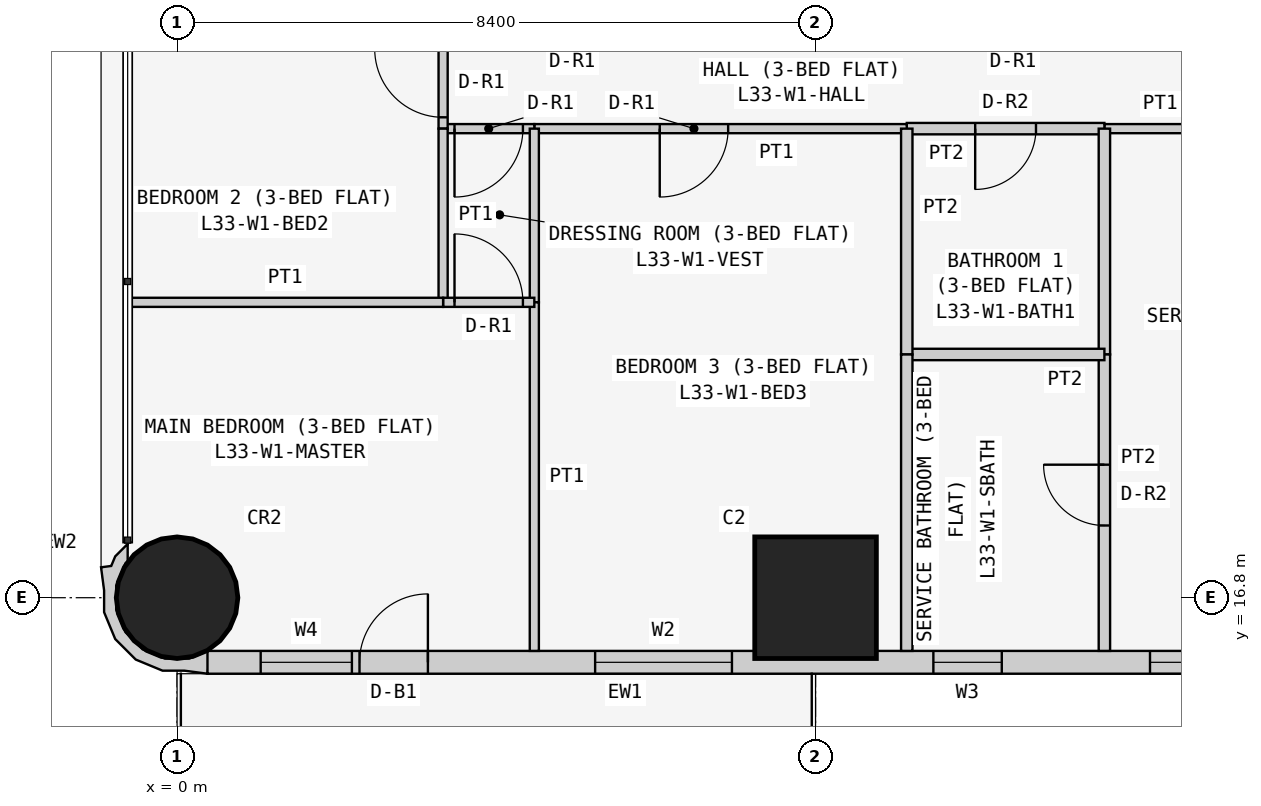
"""IFC4 building model, lengths in metres.
Left out: names, types, materials, properties, quantities, classifications, styles, units other than length and angle.
Written with IfcOpenShell. Run it as: python <this file> out.ifc"""

import sys

from ifc_helpers import new_model, si_unit, direction, frame, frame_2d, origin, origin_2d, place, context, subcontext, project, spatial, polyline, rectangle, circle, outline, extrude, element, fill, save


model = new_model("IFC4")
c1 = context("Model", 3, precision=1e-05, world=origin(), true_north=direction((0.0, 1.0)))
c2 = subcontext(c1, "Body", "Model", "MODEL_VIEW")
j1 = project(units=[si_unit("LENGTHUNIT", "METRE"), si_unit("PLANEANGLEUNIT", "RADIAN")], contexts=[c1])
p1 = place(None, origin())
s1 = spatial("IfcSite", under=j1, at=p1, CompositionType="ELEMENT")
p2 = place(p1, origin())
s2 = spatial("IfcBuilding", under=s1, at=p2, CompositionType="ELEMENT")
p3 = place(p2, frame((0.0, 0.0, 130.5)))
s3 = spatial("IfcBuildingStorey", under=s2, at=p3, CompositionType="ELEMENT", Elevation=130.5)
p4 = place(p3, frame((0.0, 16.8, 0.0), z_axis=(0.0, 0.0, 1.0), x_axis=(1.0, 0.0, 0.0)))
e1 = element("IfcColumn", 1, at=p4, inside=s3, PredefinedType="COLUMN", context=c2, shape_type="SweptSolid", body=[
    extrude(circle(Radius=0.8, at=origin_2d()), origin(), (0.0, 0.0, 1.0), 3.6),
])
p5 = place(p3, frame((8.4, 16.8, 0.0), z_axis=(0.0, 0.0, 1.0), x_axis=(1.0, 0.0, 0.0)))
e2 = element("IfcColumn", 2, at=p5, inside=s3, PredefinedType="COLUMN", context=c2, shape_type="SweptSolid", body=[
    extrude(rectangle(XDim=1.6, YDim=1.6, at=origin_2d()), origin(), (0.0, 0.0, 1.0), 3.6),
])
p6 = place(p3, frame((0.4, 15.95, 0.0), z_axis=(0.0, 0.0, 1.0), x_axis=(1.0, 0.0, 0.0)))
e3 = element("IfcWall", 3, at=p6, inside=s3, PredefinedType="SOLIDWALL", context=c2, shape_type="SweptSolid", body=[
    extrude(rectangle(XDim=15.7, YDim=0.3, at=frame_2d((7.85, 0.0))), origin(), (0.0, 0.0, 1.0), 3.45),
])
p7 = place(p6, frame((12.4, 0.0, 0.9)))
e4 = element("IfcOpeningElement", 4, at=p7, cuts=e3, PredefinedType="OPENING", context=c2, shape_type="SweptSolid", body=[
    extrude(rectangle(XDim=1.8, YDim=1.5, at=frame_2d((0.9, 0.75))), frame((0.0, 0.16, 0.0), z_axis=(0.0, -1.0, 0.0), x_axis=(1.0, 0.0, 0.0)), (0.0, 0.0, 1.0), 0.32),
])
p8 = place(p6, frame((9.55, 0.0, 1.5)))
e5 = element("IfcOpeningElement", 5, at=p8, cuts=e3, PredefinedType="OPENING", context=c2, shape_type="SweptSolid", body=[
    extrude(rectangle(XDim=0.9, YDim=0.7, at=frame_2d((0.45, 0.35))), frame((0.0, 0.16, 0.0), z_axis=(0.0, -1.0, 0.0), x_axis=(1.0, 0.0, 0.0)), (0.0, 0.0, 1.0), 0.32),
])
p9 = place(p6, frame((5.1, 0.0, 0.9)))
e6 = element("IfcOpeningElement", 6, at=p9, cuts=e3, PredefinedType="OPENING", context=c2, shape_type="SweptSolid", body=[
    extrude(rectangle(XDim=1.8, YDim=1.5, at=frame_2d((0.9, 0.75))), frame((0.0, 0.16, 0.0), z_axis=(0.0, -1.0, 0.0), x_axis=(1.0, 0.0, 0.0)), (0.0, 0.0, 1.0), 0.32),
])
p10 = place(p6, frame((2.0, 0.0, 0.0)))
e7 = element("IfcOpeningElement", 7, at=p10, cuts=e3, PredefinedType="OPENING", context=c2, shape_type="SweptSolid", body=[
    extrude(rectangle(XDim=0.9, YDim=2.4, at=frame_2d((0.45, 1.2))), frame((0.0, 0.16, 0.0), z_axis=(0.0, -1.0, 0.0), x_axis=(1.0, 0.0, 0.0)), (0.0, 0.0, 1.0), 0.32),
])
p11 = place(p6, frame((0.7, 0.0, 0.9)))
e8 = element("IfcOpeningElement", 8, at=p11, cuts=e3, PredefinedType="OPENING", context=c2, shape_type="SweptSolid", body=[
    extrude(rectangle(XDim=1.2, YDim=1.5, at=frame_2d((0.6, 0.75))), frame((0.0, 0.16, 0.0), z_axis=(0.0, -1.0, 0.0), x_axis=(1.0, 0.0, 0.0)), (0.0, 0.0, 1.0), 0.32),
])
p12 = place(p3, frame((-0.595, 17.448, 0.0), z_axis=(0.0, 0.0, 1.0), x_axis=(-0.93923434088, -0.343276641956, 0.0)))
e9 = element("IfcWall", 9, at=p12, inside=s3, PredefinedType="SOLIDWALL", context=c2, shape_type="SweptSolid", body=[
    extrude(outline(polyline([(-0.369, 1.89), (-0.509, 1.621), (-0.491, 1.614), (-0.479, 1.609), (-0.211, 1.62), (0.088, 1.511), (0.323, 1.295), (0.457, 1.006), (0.47, 0.688), (0.361, 0.389), (0.146, 0.154), (0.108, 0.137), (0.031, -0.075), (0.241, 0.023), (0.334, 0.124), (0.465, 0.094), (0.532, 0.393), (0.631, 0.663), (0.614, 1.045), (0.453, 1.391), (0.172, 1.649), (-0.098, 1.748), (-0.369, 1.89)])), origin(), (0.0, 0.0, 1.0), 3.45),
])
p13 = place(p3, frame((12.2, 22.971, 0.0), z_axis=(0.0, 0.0, 1.0), x_axis=(1.0, 0.0, 0.0)))
e10 = element("IfcWall", 10, at=p13, inside=s3, PredefinedType="PARTITIONING", context=c2, shape_type="SweptSolid", body=[
    extrude(rectangle(XDim=3.675, YDim=0.12, at=frame_2d((1.837, 0.0))), origin(), (0.0, 0.0, 1.0), 3.45),
])
p14 = place(p13, frame((1.35, 0.0, 0.0)))
e11 = element("IfcOpeningElement", 11, at=p14, cuts=e10, PredefinedType="OPENING", context=c2, shape_type="SweptSolid", body=[
    extrude(rectangle(XDim=0.9, YDim=2.1, at=frame_2d((0.45, 1.05))), frame((0.0, 0.07, 0.0), z_axis=(0.0, -1.0, 0.0), x_axis=(1.0, 0.0, 0.0)), (0.0, 0.0, 1.0), 0.14),
])
p15 = place(p3, frame((9.6, 22.971, 0.0), z_axis=(0.0, 0.0, 1.0), x_axis=(1.0, 0.0, 0.0)))
e12 = element("IfcWall", 12, at=p15, inside=s3, PredefinedType="PARTITIONING", context=c2, shape_type="SweptSolid", body=[
    extrude(rectangle(XDim=2.6, YDim=0.15, at=frame_2d((1.3, 0.0))), origin(), (0.0, 0.0, 1.0), 3.45),
])
p16 = place(p15, frame((0.9, 0.0, 0.0)))
e13 = element("IfcOpeningElement", 13, at=p16, cuts=e12, PredefinedType="OPENING", context=c2, shape_type="SweptSolid", body=[
    extrude(rectangle(XDim=0.8, YDim=2.1, at=frame_2d((0.4, 1.05))), frame((0.0, 0.085, 0.0), z_axis=(0.0, -1.0, 0.0), x_axis=(1.0, 0.0, 0.0)), (0.0, 0.0, 1.0), 0.17),
])
p17 = place(p3, frame((4.7, 22.971, 0.0), z_axis=(0.0, 0.0, 1.0), x_axis=(1.0, 0.0, 0.0)))
e14 = element("IfcWall", 14, at=p17, inside=s3, PredefinedType="PARTITIONING", context=c2, shape_type="SweptSolid", body=[
    extrude(rectangle(XDim=4.9, YDim=0.12, at=frame_2d((2.45, 0.0))), origin(), (0.0, 0.0, 1.0), 3.45),
])
p18 = place(p17, frame((1.65, 0.0, 0.0)))
e15 = element("IfcOpeningElement", 15, at=p18, cuts=e14, PredefinedType="OPENING", context=c2, shape_type="SweptSolid", body=[
    extrude(rectangle(XDim=0.9, YDim=2.1, at=frame_2d((0.45, 1.05))), frame((0.0, 0.07, 0.0), z_axis=(0.0, -1.0, 0.0), x_axis=(1.0, 0.0, 0.0)), (0.0, 0.0, 1.0), 0.14),
])
p19 = place(p3, frame((3.5, 22.971, 0.0), z_axis=(0.0, 0.0, 1.0), x_axis=(1.0, 0.0, 0.0)))
e16 = element("IfcWall", 16, at=p19, inside=s3, PredefinedType="PARTITIONING", context=c2, shape_type="SweptSolid", body=[
    extrude(rectangle(XDim=1.2, YDim=0.12, at=frame_2d((0.6, 0.0))), origin(), (0.0, 0.0, 1.0), 3.45),
])
p20 = place(p19, frame((0.15, 0.0, 0.0)))
e17 = element("IfcOpeningElement", 17, at=p20, cuts=e16, PredefinedType="OPENING", context=c2, shape_type="SweptSolid", body=[
    extrude(rectangle(XDim=0.9, YDim=2.1, at=frame_2d((0.45, 1.05))), frame((0.0, 0.07, 0.0), z_axis=(0.0, -1.0, 0.0), x_axis=(1.0, 0.0, 0.0)), (0.0, 0.0, 1.0), 0.14),
])
p21 = place(p3, frame((3.5, 24.171, 0.0), z_axis=(0.0, 0.0, 1.0), x_axis=(0.0, -1.0, 0.0)))
e18 = element("IfcWall", 18, at=p21, inside=s3, PredefinedType="PARTITIONING", context=c2, shape_type="SweptSolid", body=[
    extrude(rectangle(XDim=1.2, YDim=0.12, at=frame_2d((0.6, 0.0))), origin(), (0.0, 0.0, 1.0), 3.45),
])
p22 = place(p21, frame((0.151, 0.0, 0.0)))
e19 = element("IfcOpeningElement", 19, at=p22, cuts=e18, PredefinedType="OPENING", context=c2, shape_type="SweptSolid", body=[
    extrude(rectangle(XDim=0.9, YDim=2.1, at=frame_2d((0.45, 1.05))), frame((0.0, 0.07, 0.0), z_axis=(0.0, -1.0, 0.0), x_axis=(1.0, 0.0, 0.0)), (0.0, 0.0, 1.0), 0.14),
])
p23 = place(p3, frame((12.2, 22.971, 0.0), z_axis=(0.0, 0.0, 1.0), x_axis=(0.0, -1.0, 0.0)))
e20 = element("IfcWall", 20, at=p23, inside=s3, PredefinedType="PARTITIONING", context=c2, shape_type="SweptSolid", body=[
    extrude(rectangle(XDim=2.971, YDim=0.15, at=frame_2d((1.485, 0.0))), origin(), (0.0, 0.0, 1.0), 3.45),
])
p24 = place(p3, frame((12.2, 20.0, 0.0), z_axis=(0.0, 0.0, 1.0), x_axis=(0.0, -1.0, 0.0)))
e21 = element("IfcWall", 21, at=p24, inside=s3, PredefinedType="PARTITIONING", context=c2, shape_type="SweptSolid", body=[
    extrude(rectangle(XDim=3.9, YDim=0.15, at=frame_2d((1.95, 0.0))), origin(), (0.0, 0.0, 1.0), 3.45),
])
p25 = place(p24, frame((1.45, 0.0, 0.0)))
e22 = element("IfcOpeningElement", 22, at=p25, cuts=e21, PredefinedType="OPENING", context=c2, shape_type="SweptSolid", body=[
    extrude(rectangle(XDim=0.8, YDim=2.1, at=frame_2d((0.4, 1.05))), frame((0.0, 0.085, 0.0), z_axis=(0.0, -1.0, 0.0), x_axis=(1.0, 0.0, 0.0)), (0.0, 0.0, 1.0), 0.17),
])
p26 = place(p3, frame((9.6, 20.0, 0.0), z_axis=(0.0, 0.0, 1.0), x_axis=(1.0, 0.0, 0.0)))
e23 = element("IfcWall", 23, at=p26, inside=s3, PredefinedType="PARTITIONING", context=c2, shape_type="SweptSolid", body=[
    extrude(rectangle(XDim=2.6, YDim=0.15, at=frame_2d((1.3, 0.0))), origin(), (0.0, 0.0, 1.0), 3.45),
])
p27 = place(p3, frame((9.6, 22.971, 0.0), z_axis=(0.0, 0.0, 1.0), x_axis=(0.0, -1.0, 0.0)))
e24 = element("IfcWall", 24, at=p27, inside=s3, PredefinedType="PARTITIONING", context=c2, shape_type="SweptSolid", body=[
    extrude(rectangle(XDim=2.971, YDim=0.15, at=frame_2d((1.485, 0.0))), origin(), (0.0, 0.0, 1.0), 3.45),
])
p28 = place(p3, frame((9.6, 20.0, 0.0), z_axis=(0.0, 0.0, 1.0), x_axis=(0.0, -1.0, 0.0)))
e25 = element("IfcWall", 25, at=p28, inside=s3, PredefinedType="PARTITIONING", context=c2, shape_type="SweptSolid", body=[
    extrude(rectangle(XDim=3.9, YDim=0.15, at=frame_2d((1.95, 0.0))), origin(), (0.0, 0.0, 1.0), 3.45),
])
p29 = place(p3, frame((4.7, 22.971, 0.0), z_axis=(0.0, 0.0, 1.0), x_axis=(0.0, -1.0, 0.0)))
e26 = element("IfcWall", 26, at=p29, inside=s3, PredefinedType="PARTITIONING", context=c2, shape_type="SweptSolid", body=[
    extrude(rectangle(XDim=2.285, YDim=0.12, at=frame_2d((1.143, 0.0))), origin(), (0.0, 0.0, 1.0), 3.45),
])
p30 = place(p3, frame((4.7, 20.686, 0.0), z_axis=(0.0, 0.0, 1.0), x_axis=(0.0, -1.0, 0.0)))
e27 = element("IfcWall", 27, at=p30, inside=s3, PredefinedType="PARTITIONING", context=c2, shape_type="SweptSolid", body=[
    extrude(rectangle(XDim=4.586, YDim=0.12, at=frame_2d((2.293, 0.0))), origin(), (0.0, 0.0, 1.0), 3.45),
])
p31 = place(p3, frame((3.5, 22.971, 0.0), z_axis=(0.0, 0.0, 1.0), x_axis=(0.0, -1.0, 0.0)))
e28 = element("IfcWall", 28, at=p31, inside=s3, PredefinedType="PARTITIONING", context=c2, shape_type="SweptSolid", body=[
    extrude(rectangle(XDim=2.285, YDim=0.12, at=frame_2d((1.143, 0.0))), origin(), (0.0, 0.0, 1.0), 3.45),
])
p32 = place(p3, frame((3.5, 20.686, 0.0), z_axis=(0.0, 0.0, 1.0), x_axis=(1.0, 0.0, 0.0)))
e29 = element("IfcWall", 29, at=p32, inside=s3, PredefinedType="PARTITIONING", context=c2, shape_type="SweptSolid", body=[
    extrude(rectangle(XDim=1.2, YDim=0.12, at=frame_2d((0.6, 0.0))), origin(), (0.0, 0.0, 1.0), 3.45),
])
p33 = place(p32, frame((0.15, 0.0, 0.0)))
e30 = element("IfcOpeningElement", 30, at=p33, cuts=e29, PredefinedType="OPENING", context=c2, shape_type="SweptSolid", body=[
    extrude(rectangle(XDim=0.9, YDim=2.1, at=frame_2d((0.45, 1.05))), frame((0.0, 0.07, 0.0), z_axis=(0.0, -1.0, 0.0), x_axis=(1.0, 0.0, 0.0)), (0.0, 0.0, 1.0), 0.14),
])
p34 = place(p3, frame((-0.65, 20.686, 0.0), z_axis=(0.0, 0.0, 1.0), x_axis=(1.0, 0.0, 0.0)))
e31 = element("IfcWall", 31, at=p34, inside=s3, PredefinedType="PARTITIONING", context=c2, shape_type="SweptSolid", body=[
    extrude(rectangle(XDim=4.15, YDim=0.12, at=frame_2d((2.075, 0.0))), origin(), (0.0, 0.0, 1.0), 3.45),
])
p35 = place(p7, origin())
e32 = element("IfcWindow", 32, at=p35, inside=s3, PartitioningType="SINGLE_PANEL", PredefinedType="WINDOW", context=c2, shape_type="SweptSolid", body=[
    extrude(rectangle(XDim=1.8, YDim=1.5, at=frame_2d((0.9, 0.75))), frame((0.0, 0.03, 0.0), z_axis=(0.0, -1.0, 0.0), x_axis=(1.0, 0.0, 0.0)), (0.0, 0.0, 1.0), 0.06),
])
fill(e4, e32)
p36 = place(p8, origin())
e33 = element("IfcWindow", 33, at=p36, inside=s3, PartitioningType="SINGLE_PANEL", PredefinedType="WINDOW", context=c2, shape_type="SweptSolid", body=[
    extrude(rectangle(XDim=0.9, YDim=0.7, at=frame_2d((0.45, 0.35))), frame((0.0, 0.03, 0.0), z_axis=(0.0, -1.0, 0.0), x_axis=(1.0, 0.0, 0.0)), (0.0, 0.0, 1.0), 0.06),
])
fill(e5, e33)
p37 = place(p9, origin())
e34 = element("IfcWindow", 34, at=p37, inside=s3, PartitioningType="SINGLE_PANEL", PredefinedType="WINDOW", context=c2, shape_type="SweptSolid", body=[
    extrude(rectangle(XDim=1.8, YDim=1.5, at=frame_2d((0.9, 0.75))), frame((0.0, 0.03, 0.0), z_axis=(0.0, -1.0, 0.0), x_axis=(1.0, 0.0, 0.0)), (0.0, 0.0, 1.0), 0.06),
])
fill(e6, e34)
p38 = place(p10, origin())
e35 = element("IfcDoor", 35, at=p38, inside=s3, OperationType="SINGLE_SWING_RIGHT", PredefinedType="DOOR", context=c2, shape_type="SweptSolid", body=[
    extrude(rectangle(XDim=0.9, YDim=2.4, at=frame_2d((0.45, 1.2))), frame((0.0, 0.025, 0.0), z_axis=(0.0, -1.0, 0.0), x_axis=(1.0, 0.0, 0.0)), (0.0, 0.0, 1.0), 0.05),
])
fill(e7, e35)
p39 = place(p11, origin())
e36 = element("IfcWindow", 36, at=p39, inside=s3, PartitioningType="SINGLE_PANEL", PredefinedType="WINDOW", context=c2, shape_type="SweptSolid", body=[
    extrude(rectangle(XDim=1.2, YDim=1.5, at=frame_2d((0.6, 0.75))), frame((0.0, 0.03, 0.0), z_axis=(0.0, -1.0, 0.0), x_axis=(1.0, 0.0, 0.0)), (0.0, 0.0, 1.0), 0.06),
])
fill(e8, e36)
p40 = place(p25, frame((0.8, 0.0, 0.0), z_axis=(0.0, 0.0, 1.0), x_axis=(-1.0, 0.0, 0.0)))
e37 = element("IfcDoor", 37, at=p40, inside=s3, OperationType="SINGLE_SWING_RIGHT", PredefinedType="DOOR", context=c2, shape_type="SweptSolid", body=[
    extrude(rectangle(XDim=0.8, YDim=2.1, at=frame_2d((0.4, 1.05))), frame((0.0, 0.025, 0.0), z_axis=(0.0, -1.0, 0.0), x_axis=(1.0, 0.0, 0.0)), (0.0, 0.0, 1.0), 0.05),
])
fill(e22, e37)
p41 = place(p16, frame((0.8, 0.0, 0.0), z_axis=(0.0, 0.0, 1.0), x_axis=(-1.0, 0.0, 0.0)))
e38 = element("IfcDoor", 38, at=p41, inside=s3, OperationType="SINGLE_SWING_RIGHT", PredefinedType="DOOR", context=c2, shape_type="SweptSolid", body=[
    extrude(rectangle(XDim=0.8, YDim=2.1, at=frame_2d((0.4, 1.05))), frame((0.0, 0.025, 0.0), z_axis=(0.0, -1.0, 0.0), x_axis=(1.0, 0.0, 0.0)), (0.0, 0.0, 1.0), 0.05),
])
fill(e13, e38)
p42 = place(p18, frame((0.9, 0.0, 0.0), z_axis=(0.0, 0.0, 1.0), x_axis=(-1.0, 0.0, 0.0)))
e39 = element("IfcDoor", 39, at=p42, inside=s3, OperationType="SINGLE_SWING_RIGHT", PredefinedType="DOOR", context=c2, shape_type="SweptSolid", body=[
    extrude(rectangle(XDim=0.9, YDim=2.1, at=frame_2d((0.45, 1.05))), frame((0.0, 0.025, 0.0), z_axis=(0.0, -1.0, 0.0), x_axis=(1.0, 0.0, 0.0)), (0.0, 0.0, 1.0), 0.05),
])
fill(e15, e39)
p43 = place(p20, frame((0.9, 0.0, 0.0), z_axis=(0.0, 0.0, 1.0), x_axis=(-1.0, 0.0, 0.0)))
e40 = element("IfcDoor", 40, at=p43, inside=s3, OperationType="SINGLE_SWING_RIGHT", PredefinedType="DOOR", context=c2, shape_type="SweptSolid", body=[
    extrude(rectangle(XDim=0.9, YDim=2.1, at=frame_2d((0.45, 1.05))), frame((0.0, 0.025, 0.0), z_axis=(0.0, -1.0, 0.0), x_axis=(1.0, 0.0, 0.0)), (0.0, 0.0, 1.0), 0.05),
])
fill(e17, e40)
p44 = place(p33, origin())
e41 = element("IfcDoor", 41, at=p44, inside=s3, OperationType="SINGLE_SWING_LEFT", PredefinedType="DOOR", context=c2, shape_type="SweptSolid", body=[
    extrude(rectangle(XDim=0.9, YDim=2.1, at=frame_2d((0.45, 1.05))), frame((0.0, 0.025, 0.0), z_axis=(0.0, -1.0, 0.0), x_axis=(1.0, 0.0, 0.0)), (0.0, 0.0, 1.0), 0.05),
])
fill(e30, e41)
p45 = place(p22, frame((0.9, 0.0, 0.0), z_axis=(0.0, 0.0, 1.0), x_axis=(-1.0, 0.0, 0.0)))
e42 = element("IfcDoor", 42, at=p45, inside=s3, OperationType="SINGLE_SWING_RIGHT", PredefinedType="DOOR", context=c2, shape_type="SweptSolid", body=[
    extrude(rectangle(XDim=0.9, YDim=2.1, at=frame_2d((0.45, 1.05))), frame((0.0, 0.025, 0.0), z_axis=(0.0, -1.0, 0.0), x_axis=(1.0, 0.0, 0.0)), (0.0, 0.0, 1.0), 0.05),
])
fill(e19, e42)
save(model, sys.argv[1])
